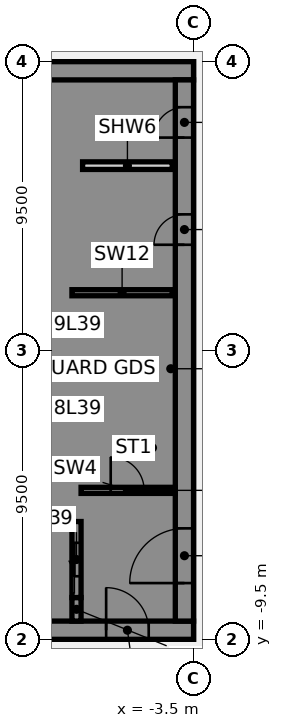
"""IFC4 building model, lengths in metres.
Left out: names, types, materials, properties, quantities, classifications, styles, units other than length and angle.
Written with IfcOpenShell. Run it as: python <this file> out.ifc"""

import sys

from ifc_helpers import new_model, si_unit, direction, frame, frame_2d, origin, place, context, subcontext, project, spatial, polyline, rectangle, outline, extrude, element, fill, save


model = new_model("IFC4")
c1 = context("Model", 3, precision=1e-05, world=origin(), true_north=direction((0.0, 1.0)))
c2 = subcontext(c1, "Body", "Model", "MODEL_VIEW")
j1 = project(units=[si_unit("LENGTHUNIT", "METRE"), si_unit("PLANEANGLEUNIT", "RADIAN")], contexts=[c1])
p1 = place(None, origin())
s1 = spatial("IfcSite", under=j1, at=p1, CompositionType="ELEMENT")
p2 = place(p1, origin())
s2 = spatial("IfcBuilding", under=s1, at=p2, CompositionType="ELEMENT")
p3 = place(p2, frame((0.0, 0.0, 159.25)))
s3 = spatial("IfcBuildingStorey", under=s2, at=p3, CompositionType="ELEMENT", Elevation=159.25)
p4 = place(p3, frame((-16.5, -9.2, 0.0), z_axis=(0.0, 0.0, 1.0), x_axis=(1.0, 0.0, 0.0)))
e1 = element("IfcWall", 1, at=p4, inside=s3, PredefinedType="SHEAR", context=c2, shape_type="SweptSolid", body=[
    extrude(rectangle(XDim=13.0, YDim=0.6, at=frame_2d((6.5, 0.0))), origin(), (0.0, 0.0, 1.0), 3.61),
])
p5 = place(p4, frame((4.15, 0.0, 0.0)))
e2 = element("IfcOpeningElement", 2, at=p5, cuts=e1, PredefinedType="OPENING", context=c2, shape_type="SweptSolid", body=[
    extrude(rectangle(XDim=1.4, YDim=2.1, at=frame_2d((0.7, 1.05))), frame((0.0, 0.31, 0.0), z_axis=(0.0, -1.0, 0.0), x_axis=(1.0, 0.0, 0.0)), (0.0, 0.0, 1.0), 0.62),
])
p6 = place(p4, frame((10.125, 0.0, 0.0)))
e3 = element("IfcOpeningElement", 3, at=p6, cuts=e1, PredefinedType="OPENING", context=c2, shape_type="SweptSolid", body=[
    extrude(rectangle(XDim=1.4, YDim=2.1, at=frame_2d((0.7, 1.05))), frame((0.0, 0.31, 0.0), z_axis=(0.0, -1.0, 0.0), x_axis=(1.0, 0.0, 0.0)), (0.0, 0.0, 1.0), 0.62),
])
p7 = place(p3, frame((-16.5, 9.2, 0.0), z_axis=(0.0, 0.0, 1.0), x_axis=(1.0, 0.0, 0.0)))
e4 = element("IfcWall", 4, at=p7, inside=s3, PredefinedType="SHEAR", context=c2, shape_type="SweptSolid", body=[
    extrude(rectangle(XDim=13.0, YDim=0.6, at=frame_2d((6.5, 0.0))), origin(), (0.0, 0.0, 1.0), 3.61),
])
p8 = place(p3, origin())
e5 = element("IfcWall", 5, at=p8, inside=s3, PredefinedType="SHEAR", context=c2, shape_type="SweptSolid", body=[
    extrude(outline(polyline([(-9.8, -5.375), (-9.8, -5.625), (-7.5, -5.625), (-7.2, -5.625), (-7.2, 8.9), (-7.5, 8.9), (-9.8, 8.9), (-9.8, 8.125), (-7.5, 8.125), (-7.5, 5.625), (-9.8, 5.625), (-9.8, 5.375), (-7.5, 5.375), (-7.5, 2.875), (-9.8, 2.875), (-9.8, 2.625), (-7.5, 2.625), (-7.5, 0.125), (-9.8, 0.125), (-9.8, -0.125), (-7.5, -0.125), (-7.5, -2.625), (-9.8, -2.625), (-9.8, -2.875), (-7.5, -2.875), (-7.5, -5.375), (-9.8, -5.375)])), origin(), (0.0, 0.0, 1.0), 3.61),
])
p9 = place(p3, origin())
e6 = element("IfcWall", 6, at=p9, inside=s3, PredefinedType="SHEAR", context=c2, shape_type="SweptSolid", body=[
    extrude(outline(polyline([(-7.5, -8.125), (-9.55, -8.125), (-9.55, -5.625), (-9.8, -5.625), (-9.8, -8.125), (-9.8, -8.9), (-7.5, -8.9), (-7.5, -8.125)])), origin(), (0.0, 0.0, 1.0), 3.61),
])
p10 = place(p3, frame((-7.35, -8.9, 0.0), z_axis=(0.0, 0.0, 1.0), x_axis=(0.0, 1.0, 0.0)))
e7 = element("IfcWall", 7, at=p10, inside=s3, PredefinedType="SHEAR", context=c2, shape_type="SweptSolid", body=[
    extrude(rectangle(XDim=0.775, YDim=0.3, at=frame_2d((0.387, 0.0))), origin(), (0.0, 0.0, 1.0), 3.61),
])
p11 = place(p3, frame((-7.5, 1.9, 0.0), z_axis=(0.0, 0.0, 1.0), x_axis=(1.0, 0.0, 0.0)))
e8 = element("IfcWall", 8, at=p11, inside=s3, PredefinedType="SHEAR", context=c2, shape_type="SweptSolid", body=[
    extrude(rectangle(XDim=3.3, YDim=0.2, at=frame_2d((1.65, 0.0))), origin(), (0.0, 0.0, 1.0), 3.61),
])
p12 = place(p3, frame((-7.35, -8.125, 0.0), z_axis=(0.0, 0.0, 1.0), x_axis=(0.0, 1.0, 0.0)))
e9 = element("IfcWall", 9, at=p12, inside=s3, PredefinedType="SHEAR", context=c2, shape_type="SweptSolid", body=[
    extrude(rectangle(XDim=2.5, YDim=0.3, at=frame_2d((1.25, 0.0))), origin(), (0.0, 0.0, 1.0), 3.61),
])
p13 = place(p12, frame((0.7, 0.0, 0.0)))
e10 = element("IfcOpeningElement", 10, at=p13, cuts=e9, PredefinedType="OPENING", context=c2, shape_type="SweptSolid", body=[
    extrude(rectangle(XDim=1.1, YDim=2.1, at=frame_2d((0.55, 1.05))), frame((0.0, 0.16, 0.0), z_axis=(0.0, -1.0, 0.0), x_axis=(1.0, 0.0, 0.0)), (0.0, 0.0, 1.0), 0.32),
])
p14 = place(p3, frame((-3.8, -8.9, 0.0), z_axis=(0.0, 0.0, 1.0), x_axis=(0.0, 1.0, 0.0)))
e11 = element("IfcWall", 11, at=p14, inside=s3, PredefinedType="SHEAR", context=c2, shape_type="SweptSolid", body=[
    extrude(rectangle(XDim=17.8, YDim=0.6, at=frame_2d((8.9, 0.0))), origin(), (0.0, 0.0, 1.0), 3.61),
])
p15 = place(p14, frame((1.25, 0.0, 0.0)))
e12 = element("IfcOpeningElement", 12, at=p15, cuts=e11, PredefinedType="OPENING", context=c2, shape_type="SweptSolid", body=[
    extrude(rectangle(XDim=1.8, YDim=2.1, at=frame_2d((0.9, 1.05))), frame((0.0, 0.31, 0.0), z_axis=(0.0, -1.0, 0.0), x_axis=(1.0, 0.0, 0.0)), (0.0, 0.0, 1.0), 0.62),
])
p16 = place(p14, frame((12.377, 0.0, 0.0)))
e13 = element("IfcOpeningElement", 13, at=p16, cuts=e11, PredefinedType="OPENING", context=c2, shape_type="SweptSolid", body=[
    extrude(rectangle(XDim=1.0, YDim=2.1, at=frame_2d((0.5, 1.05))), frame((0.0, 0.31, 0.0), z_axis=(0.0, -1.0, 0.0), x_axis=(1.0, 0.0, 0.0)), (0.0, 0.0, 1.0), 0.62),
])
p17 = place(p14, frame((15.903, 0.0, 0.0)))
e14 = element("IfcOpeningElement", 14, at=p17, cuts=e11, PredefinedType="OPENING", context=c2, shape_type="SweptSolid", body=[
    extrude(rectangle(XDim=1.0, YDim=2.1, at=frame_2d((0.5, 1.05))), frame((0.0, 0.31, 0.0), z_axis=(0.0, -1.0, 0.0), x_axis=(1.0, 0.0, 0.0)), (0.0, 0.0, 1.0), 0.62),
])
p18 = place(p3, frame((-7.15, 6.08, 0.0), z_axis=(0.0, 0.0, 1.0), x_axis=(1.0, 0.0, 0.0)))
e15 = element("IfcWall", 15, at=p18, inside=s3, PredefinedType="PARTITIONING", context=c2, shape_type="SweptSolid", body=[
    extrude(rectangle(XDim=2.95, YDim=0.25, at=frame_2d((1.475, 0.0))), origin(), (0.0, 0.0, 1.0), 3.61),
])
p19 = place(p3, frame((-7.2, -4.6, 0.0), z_axis=(0.0, 0.0, 1.0), x_axis=(1.0, 0.0, 0.0)))
e16 = element("IfcWall", 16, at=p19, inside=s3, PredefinedType="SHEAR", context=c2, shape_type="SweptSolid", body=[
    extrude(rectangle(XDim=3.1, YDim=0.2, at=frame_2d((1.55, 0.0))), origin(), (0.0, 0.0, 1.0), 3.61),
])
p20 = place(p19, frame((0.975, 0.0, 0.0)))
e17 = element("IfcOpeningElement", 17, at=p20, cuts=e16, PredefinedType="OPENING", context=c2, shape_type="SweptSolid", body=[
    extrude(rectangle(XDim=1.1, YDim=2.1, at=frame_2d((0.55, 1.05))), frame((0.0, 0.11, 0.0), z_axis=(0.0, -1.0, 0.0), x_axis=(1.0, 0.0, 0.0)), (0.0, 0.0, 1.0), 0.22),
])
p21 = place(p6, origin())
e18 = element("IfcDoor", 18, at=p21, inside=s3, OperationType="SINGLE_SWING_LEFT", PredefinedType="DOOR", context=c2, shape_type="SweptSolid", body=[
    extrude(rectangle(XDim=1.4, YDim=2.1, at=frame_2d((0.7, 1.05))), frame((0.0, 0.025, 0.0), z_axis=(0.0, -1.0, 0.0), x_axis=(1.0, 0.0, 0.0)), (0.0, 0.0, 1.0), 0.05),
])
fill(e3, e18)
p22 = place(p15, origin())
e19 = element("IfcDoor", 19, at=p22, inside=s3, OperationType="SINGLE_SWING_LEFT", PredefinedType="DOOR", context=c2, shape_type="SweptSolid", body=[
    extrude(rectangle(XDim=1.8, YDim=2.1, at=frame_2d((0.9, 1.05))), frame((0.0, 0.025, 0.0), z_axis=(0.0, -1.0, 0.0), x_axis=(1.0, 0.0, 0.0)), (0.0, 0.0, 1.0), 0.05),
])
fill(e12, e19)
p23 = place(p16, origin())
e20 = element("IfcDoor", 20, at=p23, inside=s3, OperationType="SINGLE_SWING_LEFT", PredefinedType="DOOR", context=c2, shape_type="SweptSolid", body=[
    extrude(rectangle(XDim=1.0, YDim=2.1, at=frame_2d((0.5, 1.05))), frame((0.0, 0.275, 0.0), z_axis=(0.0, -1.0, 0.0), x_axis=(1.0, 0.0, 0.0)), (0.0, 0.0, 1.0), 0.05),
])
fill(e13, e20)
p24 = place(p17, origin())
e21 = element("IfcDoor", 21, at=p24, inside=s3, OperationType="SINGLE_SWING_LEFT", PredefinedType="DOOR", context=c2, shape_type="SweptSolid", body=[
    extrude(rectangle(XDim=1.0, YDim=2.1, at=frame_2d((0.5, 1.05))), frame((0.0, 0.275, 0.0), z_axis=(0.0, -1.0, 0.0), x_axis=(1.0, 0.0, 0.0)), (0.0, 0.0, 1.0), 0.05),
])
fill(e14, e21)
p25 = place(p20, origin())
e22 = element("IfcDoor", 22, at=p25, inside=s3, OperationType="SINGLE_SWING_LEFT", PredefinedType="DOOR", context=c2, shape_type="SweptSolid", body=[
    extrude(rectangle(XDim=1.1, YDim=2.1, at=frame_2d((0.55, 1.05))), frame((0.0, 0.025, 0.0), z_axis=(0.0, -1.0, 0.0), x_axis=(1.0, 0.0, 0.0)), (0.0, 0.0, 1.0), 0.05),
])
fill(e17, e22)
p26 = place(p13, origin())
e23 = element("IfcDoor", 23, at=p26, inside=s3, OperationType="SLIDING_TO_LEFT", PredefinedType="DOOR", context=c2, shape_type="SweptSolid", body=[
    extrude(rectangle(XDim=1.1, YDim=2.1, at=frame_2d((0.55, 1.05))), frame((0.0, 0.025, 0.0), z_axis=(0.0, -1.0, 0.0), x_axis=(1.0, 0.0, 0.0)), (0.0, 0.0, 1.0), 0.05),
])
fill(e10, e23)
save(model, sys.argv[1])
